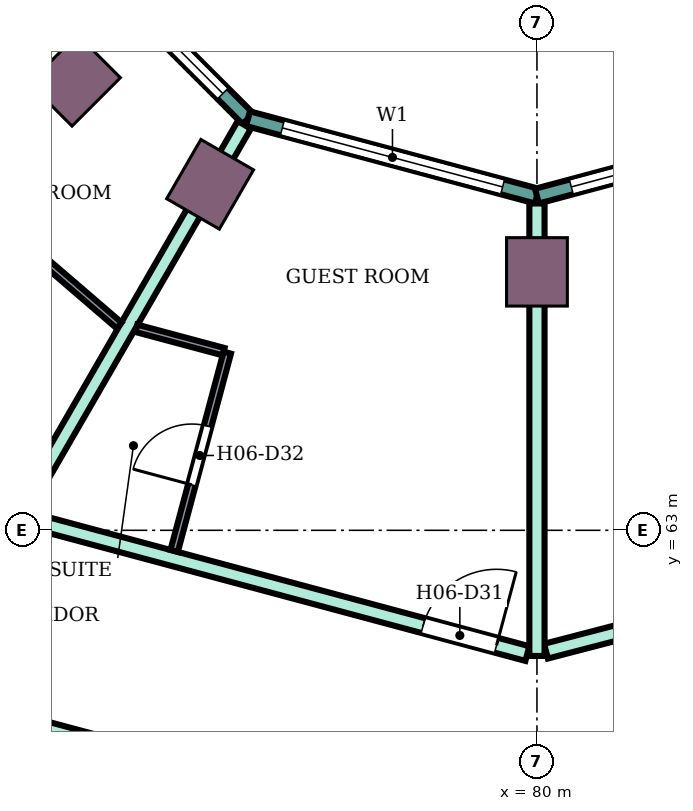
"""IFC4 building model, lengths in metres.
Left out: names, types, materials, properties, quantities, classifications, styles, units other than length and angle.
Written with IfcOpenShell. Run it as: python <this file> out.ifc"""

import sys

from ifc_helpers import new_model, si_unit, direction, frame, frame_2d, origin, origin_2d, place, context, subcontext, project, spatial, rectangle, extrude, element, fill, save


model = new_model("IFC4")
c1 = context("Model", 3, precision=1e-05, world=origin(), true_north=direction((0.0, 1.0)))
c2 = subcontext(c1, "Body", "Model", "MODEL_VIEW")
j1 = project(units=[si_unit("LENGTHUNIT", "METRE"), si_unit("PLANEANGLEUNIT", "RADIAN")], contexts=[c1])
p1 = place(None, origin())
s1 = spatial("IfcSite", under=j1, at=p1, CompositionType="ELEMENT")
p2 = place(p1, origin())
s2 = spatial("IfcBuilding", under=s1, at=p2, CompositionType="ELEMENT")
p3 = place(p2, frame((0.0, 0.0, 101.4)))
s3 = spatial("IfcBuildingStorey", under=s2, at=p3, CompositionType="ELEMENT", Elevation=101.4)
for number, where, z_axis, x_axis in (
    (1, (73.919, 68.919, 0.0), (0.0, 0.0, 1.0), (-0.707, -0.707, 0.0)),
    (2, (75.7, 67.552, 0.0), (0.0, 0.0, 1.0), (-0.5, -0.866, 0.0)),
    (3, (80.0, 66.4, 0.0), (0.0, 0.0, 1.0), (0.0, -1.0, 0.0)),
):
    element("IfcColumn", number, at=place(p3, frame(where, z_axis=z_axis, x_axis=x_axis)), inside=s3, PredefinedType="COLUMN", context=c2, shape_type="SweptSolid", body=[
        extrude(rectangle(XDim=0.9, YDim=0.8, at=origin_2d()), origin(), (0.0, 0.0, 1.0), 3.8),
    ])
p4 = place(p3, frame((73.415, 71.198, 0.0), z_axis=(0.0, 0.0, 1.0), x_axis=(0.707106781187, -0.707106781187, 0.0)))
e4 = element("IfcWall", 4, at=p4, inside=s3, PredefinedType="NOTDEFINED", context=c2, shape_type="SweptSolid", body=[
    extrude(rectangle(XDim=3.936, YDim=0.2, at=frame_2d((1.968, 0.0))), origin(), (0.0, 0.0, 1.0), 3.8),
])
p5 = place(p4, frame((0.468, 0.0, 0.9)))
e5 = element("IfcOpeningElement", 5, at=p5, cuts=e4, PredefinedType="OPENING", context=c2, shape_type="SweptSolid", body=[
    extrude(rectangle(XDim=3.0, YDim=2.3, at=frame_2d((1.5, 1.15))), frame((0.0, 0.11, 0.0), z_axis=(0.0, -1.0, 0.0), x_axis=(1.0, 0.0, 0.0)), (0.0, 0.0, 1.0), 0.22),
])
p6 = place(p3, frame((76.198, 68.415, 0.0), z_axis=(0.0, 0.0, 1.0), x_axis=(0.965933654434, -0.258789828301, 0.0)))
e6 = element("IfcWall", 6, at=p6, inside=s3, PredefinedType="NOTDEFINED", context=c2, shape_type="SweptSolid", body=[
    extrude(rectangle(XDim=3.936, YDim=0.2, at=frame_2d((1.968, 0.0))), origin(), (0.0, 0.0, 1.0), 3.8),
])
p7 = place(p6, frame((0.468, 0.0, 0.9)))
e7 = element("IfcOpeningElement", 7, at=p7, cuts=e6, PredefinedType="OPENING", context=c2, shape_type="SweptSolid", body=[
    extrude(rectangle(XDim=3.0, YDim=2.3, at=frame_2d((1.5, 1.15))), frame((0.0, 0.11, 0.0), z_axis=(0.0, -1.0, 0.0), x_axis=(1.0, 0.0, 0.0)), (0.0, 0.0, 1.0), 0.22),
])
p8 = place(p3, frame((80.0, 67.396, 0.0), z_axis=(0.0, 0.0, 1.0), x_axis=(0.965933654434, 0.258789828301, 0.0)))
e8 = element("IfcWall", 8, at=p8, inside=s3, PredefinedType="NOTDEFINED", context=c2, shape_type="SweptSolid", body=[
    extrude(rectangle(XDim=3.936, YDim=0.2, at=frame_2d((1.968, 0.0))), origin(), (0.0, 0.0, 1.0), 3.8),
])
p9 = place(p8, frame((0.468, 0.0, 0.9)))
e9 = element("IfcOpeningElement", 9, at=p9, cuts=e8, PredefinedType="OPENING", context=c2, shape_type="SweptSolid", body=[
    extrude(rectangle(XDim=3.0, YDim=2.3, at=frame_2d((1.5, 1.15))), frame((0.0, 0.11, 0.0), z_axis=(0.0, -1.0, 0.0), x_axis=(1.0, 0.0, 0.0)), (0.0, 0.0, 1.0), 0.22),
])
p10 = place(p3, frame((71.877, 60.831, 0.0), z_axis=(0.0, 0.0, 1.0), x_axis=(0.965905026676, -0.258896657842, 0.0)))
e10 = element("IfcWall", 10, at=p10, inside=s3, PredefinedType="PARTITIONING", context=c2, shape_type="SweptSolid", body=[
    extrude(rectangle(XDim=8.36, YDim=0.2, at=frame_2d((4.18, 0.0))), origin(), (0.0, 0.0, 1.0), 3.35),
])
p11 = place(p10, frame((4.655, 0.0, 0.0)))
e11 = element("IfcOpeningElement", 11, at=p11, cuts=e10, PredefinedType="OPENING", context=c2, shape_type="SweptSolid", body=[
    extrude(rectangle(XDim=1.8, YDim=2.1, at=frame_2d((0.9, 1.05))), frame((0.0, 0.11, 0.0), z_axis=(0.0, -1.0, 0.0), x_axis=(1.0, 0.0, 0.0)), (0.0, 0.0, 1.0), 0.22),
])
p12 = place(p3, frame((73.297, 63.143, 0.0), z_axis=(0.0, 0.0, 1.0), x_axis=(0.965859030528, -0.25906820173, 0.0)))
e12 = element("IfcWall", 12, at=p12, inside=s3, PredefinedType="PARTITIONING", context=c2, shape_type="SweptSolid", body=[
    extrude(rectangle(XDim=6.81, YDim=0.2, at=frame_2d((3.405, 0.0))), origin(), (0.0, 0.0, 1.0), 3.35),
])
p13 = place(p12, frame((5.39, 0.0, 0.0)))
e13 = element("IfcOpeningElement", 13, at=p13, cuts=e12, PredefinedType="OPENING", context=c2, shape_type="SweptSolid", body=[
    extrude(rectangle(XDim=1.0, YDim=2.1, at=frame_2d((0.5, 1.05))), frame((0.0, 0.11, 0.0), z_axis=(0.0, -1.0, 0.0), x_axis=(1.0, 0.0, 0.0)), (0.0, 0.0, 1.0), 0.22),
])
p14 = place(p3, frame((73.171, 63.177, 0.0), z_axis=(0.0, 0.0, 1.0), x_axis=(0.500257106344, 0.865876912472, 0.0)))
e14 = element("IfcWall", 14, at=p14, inside=s3, PredefinedType="PARTITIONING", context=c2, shape_type="SweptSolid", body=[
    extrude(rectangle(XDim=5.955, YDim=0.2, at=frame_2d((2.978, 0.0))), origin(), (0.0, 0.0, 1.0), 3.35),
])
p15 = place(p3, frame((80.119, 61.41, 0.0), z_axis=(0.0, 0.0, 1.0), x_axis=(0.967823361235, 0.251630565408, 0.0)))
e15 = element("IfcWall", 15, at=p15, inside=s3, PredefinedType="PARTITIONING", context=c2, shape_type="SweptSolid", body=[
    extrude(rectangle(XDim=6.958, YDim=0.2, at=frame_2d((3.479, 0.0))), origin(), (0.0, 0.0, 1.0), 3.35),
])
p16 = place(p15, frame((2.529, 0.0, 0.0)))
e16 = element("IfcOpeningElement", 16, at=p16, cuts=e15, PredefinedType="OPENING", context=c2, shape_type="SweptSolid", body=[
    extrude(rectangle(XDim=1.8, YDim=2.1, at=frame_2d((0.9, 1.05))), frame((0.0, 0.11, 0.0), z_axis=(0.0, -1.0, 0.0), x_axis=(1.0, 0.0, 0.0)), (0.0, 0.0, 1.0), 0.22),
])
p17 = place(p3, frame((80.0, 58.655, 0.0), z_axis=(0.0, 0.0, 1.0), x_axis=(0.965967338894, 0.258664068224, 0.0)))
e17 = element("IfcWall", 17, at=p17, inside=s3, PredefinedType="PARTITIONING", context=c2, shape_type="SweptSolid", body=[
    extrude(rectangle(XDim=8.36, YDim=0.2, at=frame_2d((4.18, 0.0))), origin(), (0.0, 0.0, 1.0), 3.35),
])
p18 = place(p17, frame((6.86, 0.0, 0.0)))
e18 = element("IfcOpeningElement", 18, at=p18, cuts=e17, PredefinedType="OPENING", context=c2, shape_type="SweptSolid", body=[
    extrude(rectangle(XDim=1.0, YDim=2.1, at=frame_2d((0.5, 1.05))), frame((0.0, 0.11, 0.0), z_axis=(0.0, -1.0, 0.0), x_axis=(1.0, 0.0, 0.0)), (0.0, 0.0, 1.0), 0.22),
])
p19 = place(p3, frame((80.0, 61.347, 0.0), z_axis=(0.0, 0.0, 1.0), x_axis=(0.0, 1.0, 0.0)))
e19 = element("IfcWall", 19, at=p19, inside=s3, PredefinedType="PARTITIONING", context=c2, shape_type="SweptSolid", body=[
    extrude(rectangle(XDim=5.953, YDim=0.2, at=frame_2d((2.977, 0.0))), origin(), (0.0, 0.0, 1.0), 3.35),
])
p20 = place(p3, frame((73.357, 66.681, 0.0), z_axis=(0.0, 0.0, 1.0), x_axis=(0.758263469747, -0.651948242154, 0.0)))
e20 = element("IfcWall", 20, at=p20, inside=s3, PredefinedType="PARTITIONING", context=c2, shape_type="SweptSolid", body=[
    extrude(rectangle(XDim=1.511, YDim=0.1, at=frame_2d((0.755, 0.0))), origin(), (0.0, 0.0, 1.0), 3.35),
])
p21 = place(p3, frame((74.729, 65.657, 0.0), z_axis=(0.0, 0.0, 1.0), x_axis=(0.965948051503, -0.258736085224, 0.0)))
e21 = element("IfcWall", 21, at=p21, inside=s3, PredefinedType="PARTITIONING", context=c2, shape_type="SweptSolid", body=[
    extrude(rectangle(XDim=1.189, YDim=0.1, at=frame_2d((0.594, 0.0))), origin(), (0.0, 0.0, 1.0), 3.35),
])
p22 = place(p3, frame((75.227, 62.729, 0.0), z_axis=(0.0, 0.0, 1.0), x_axis=(0.258945475746, 0.965891940432, 0.0)))
e22 = element("IfcWall", 22, at=p22, inside=s3, PredefinedType="PARTITIONING", context=c2, shape_type="SweptSolid", body=[
    extrude(rectangle(XDim=2.7, YDim=0.1, at=frame_2d((1.35, 0.0))), origin(), (0.0, 0.0, 1.0), 3.35),
])
p23 = place(p22, frame((0.9, 0.0, 0.0)))
e23 = element("IfcOpeningElement", 23, at=p23, cuts=e22, PredefinedType="OPENING", context=c2, shape_type="SweptSolid", body=[
    extrude(rectangle(XDim=0.8, YDim=2.1, at=frame_2d((0.4, 1.05))), frame((0.0, 0.06, 0.0), z_axis=(0.0, -1.0, 0.0), x_axis=(1.0, 0.0, 0.0)), (0.0, 0.0, 1.0), 0.12),
])
p24 = place(p5, origin())
e24 = element("IfcWindow", 24, at=p24, inside=s3, PartitioningType="SINGLE_PANEL", PredefinedType="WINDOW", context=c2, shape_type="SweptSolid", body=[
    extrude(rectangle(XDim=3.0, YDim=2.3, at=frame_2d((1.5, 1.15))), frame((0.0, 0.03, 0.0), z_axis=(0.0, -1.0, 0.0), x_axis=(1.0, 0.0, 0.0)), (0.0, 0.0, 1.0), 0.06),
])
fill(e5, e24)
p25 = place(p7, origin())
e25 = element("IfcWindow", 25, at=p25, inside=s3, PartitioningType="SINGLE_PANEL", PredefinedType="WINDOW", context=c2, shape_type="SweptSolid", body=[
    extrude(rectangle(XDim=3.0, YDim=2.3, at=frame_2d((1.5, 1.15))), frame((0.0, 0.03, 0.0), z_axis=(0.0, -1.0, 0.0), x_axis=(1.0, 0.0, 0.0)), (0.0, 0.0, 1.0), 0.06),
])
fill(e7, e25)
p26 = place(p9, origin())
e26 = element("IfcWindow", 26, at=p26, inside=s3, PartitioningType="SINGLE_PANEL", PredefinedType="WINDOW", context=c2, shape_type="SweptSolid", body=[
    extrude(rectangle(XDim=3.0, YDim=2.3, at=frame_2d((1.5, 1.15))), frame((0.0, 0.03, 0.0), z_axis=(0.0, -1.0, 0.0), x_axis=(1.0, 0.0, 0.0)), (0.0, 0.0, 1.0), 0.06),
])
fill(e9, e26)
p27 = place(p13, origin())
e27 = element("IfcDoor", 27, at=p27, inside=s3, OperationType="SINGLE_SWING_RIGHT", PredefinedType="DOOR", context=c2, shape_type="SweptSolid", body=[
    extrude(rectangle(XDim=1.0, YDim=2.1, at=frame_2d((0.5, 1.05))), frame((0.0, 0.025, 0.0), z_axis=(0.0, -1.0, 0.0), x_axis=(1.0, 0.0, 0.0)), (0.0, 0.0, 1.0), 0.05),
])
fill(e13, e27)
p28 = place(p23, origin())
e28 = element("IfcDoor", 28, at=p28, inside=s3, OperationType="SINGLE_SWING_LEFT", PredefinedType="DOOR", context=c2, shape_type="SweptSolid", body=[
    extrude(rectangle(XDim=0.8, YDim=2.1, at=frame_2d((0.4, 1.05))), frame((0.0, 0.025, 0.0), z_axis=(0.0, -1.0, 0.0), x_axis=(1.0, 0.0, 0.0)), (0.0, 0.0, 1.0), 0.05),
])
fill(e23, e28)
save(model, sys.argv[1])
